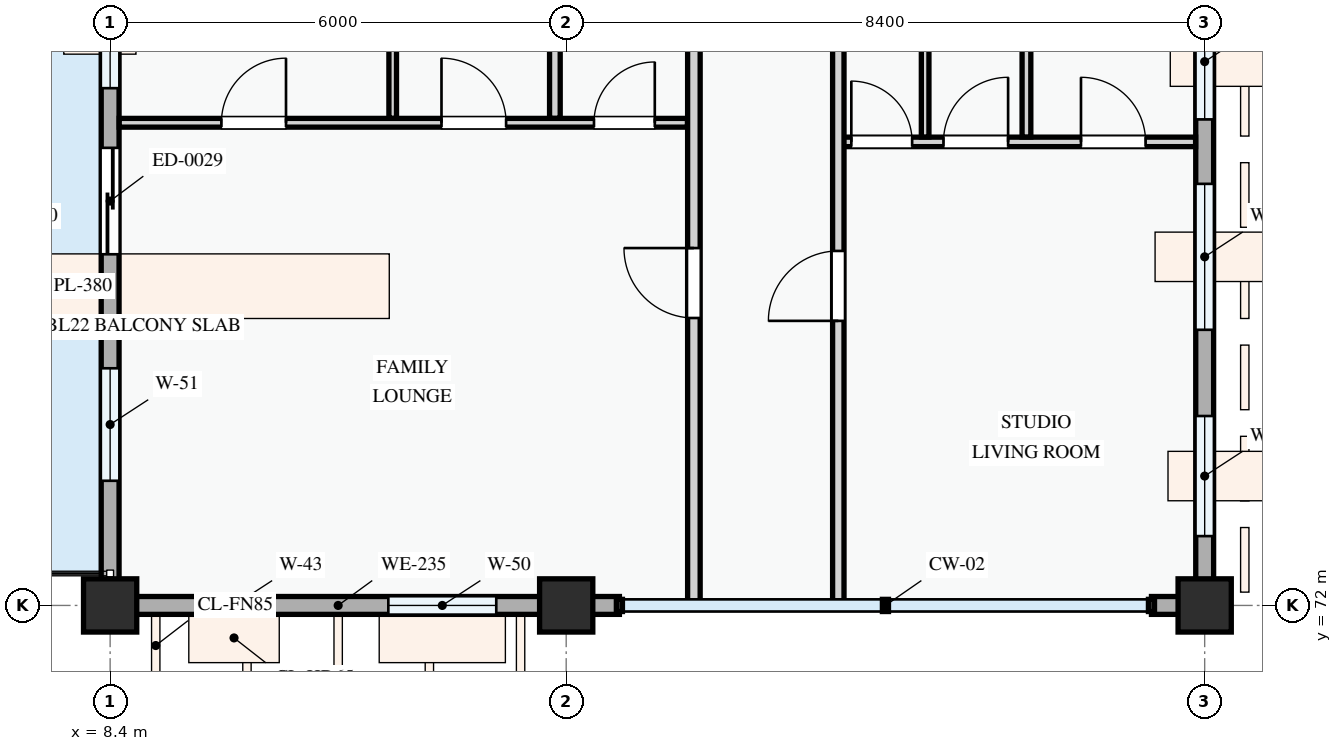
"""IFC4 building model, lengths in metres.
Left out: names, types, materials, properties, quantities, classifications, styles, units other than length and angle.
Written with IfcOpenShell. Run it as: python <this file> out.ifc"""

import sys

from ifc_helpers import new_model, si_unit, direction, frame, frame_2d, origin, origin_2d, place, context, subcontext, project, spatial, rectangle, extrude, element, fill, save


model = new_model("IFC4")
c1 = context("Model", 3, precision=1e-05, world=origin(), true_north=direction((0.0, 1.0)))
c2 = subcontext(c1, "Body", "Model", "MODEL_VIEW")
j1 = project(units=[si_unit("LENGTHUNIT", "METRE"), si_unit("PLANEANGLEUNIT", "RADIAN")], contexts=[c1])
p1 = place(None, origin())
s1 = spatial("IfcSite", under=j1, at=p1, CompositionType="ELEMENT")
p2 = place(p1, origin())
s2 = spatial("IfcBuilding", under=s1, at=p2, CompositionType="ELEMENT")
p3 = place(p2, frame((0.0, 0.0, 11.4)))
s3 = spatial("IfcBuildingStorey", under=s2, at=p3, CompositionType="ELEMENT", Elevation=11.4)
for number, where, z_axis, x_axis in (
    (1, (8.4, 72.0, 0.0), (0.0, 0.0, 1.0), (1.0, 0.0, 0.0)),
    (2, (14.4, 72.0, 0.0), (0.0, 0.0, 1.0), (1.0, 0.0, 0.0)),
    (3, (22.8, 72.0, 0.0), (0.0, 0.0, 1.0), (1.0, 0.0, 0.0)),
):
    element("IfcColumn", number, at=place(p3, frame(where, z_axis=z_axis, x_axis=x_axis)), inside=s3, PredefinedType="COLUMN", context=c2, shape_type="SweptSolid", body=[
        extrude(rectangle(XDim=0.7, YDim=0.7, at=origin_2d()), origin(), (0.0, 0.0, 1.0), 3.3),
    ])
p4 = place(p3, frame((8.4, 80.4, 0.0), z_axis=(0.0, 0.0, 1.0), x_axis=(0.0, -1.0, 0.0)))
e4 = element("IfcWall", 4, at=p4, inside=s3, PredefinedType="STANDARD", context=c2, shape_type="SweptSolid", body=[
    extrude(rectangle(XDim=8.4, YDim=0.235, at=frame_2d((4.2, 0.0))), origin(), (0.0, 0.0, 1.0), 2.425),
])
p5 = place(p4, frame((2.38, 0.0, 0.0)))
e5 = element("IfcOpeningElement", 5, at=p5, cuts=e4, PredefinedType="OPENING", context=c2, shape_type="SweptSolid", body=[
    extrude(rectangle(XDim=1.4, YDim=2.2, at=frame_2d((0.7, 1.1))), frame((0.0, 0.127, 0.0), z_axis=(0.0, -1.0, 0.0), x_axis=(1.0, 0.0, 0.0)), (0.0, 0.0, 1.0), 0.255),
])
p6 = place(p4, frame((0.645, 0.0, 0.78)))
e6 = element("IfcOpeningElement", 6, at=p6, cuts=e4, PredefinedType="OPENING", context=c2, shape_type="SweptSolid", body=[
    extrude(rectangle(XDim=0.95, YDim=1.15, at=frame_2d((0.475, 0.575))), frame((0.0, 0.127, 0.0), z_axis=(0.0, -1.0, 0.0), x_axis=(1.0, 0.0, 0.0)), (0.0, 0.0, 1.0), 0.255),
])
p7 = place(p4, frame((5.28, 0.0, 0.78)))
e7 = element("IfcOpeningElement", 7, at=p7, cuts=e4, PredefinedType="OPENING", context=c2, shape_type="SweptSolid", body=[
    extrude(rectangle(XDim=1.48, YDim=1.52, at=frame_2d((0.74, 0.76))), frame((0.0, 0.127, 0.0), z_axis=(0.0, -1.0, 0.0), x_axis=(1.0, 0.0, 0.0)), (0.0, 0.0, 1.0), 0.255),
])
p8 = place(p3, frame((8.4, 72.0, 0.0), z_axis=(0.0, 0.0, 1.0), x_axis=(1.0, 0.0, 0.0)))
e8 = element("IfcWall", 8, at=p8, inside=s3, PredefinedType="STANDARD", context=c2, shape_type="SweptSolid", body=[
    extrude(rectangle(XDim=6.0, YDim=0.235, at=frame_2d((3.0, 0.0))), origin(), (0.0, 0.0, 1.0), 2.475),
])
p9 = place(p8, frame((1.155, 0.0, 0.78)))
e9 = element("IfcOpeningElement", 9, at=p9, cuts=e8, PredefinedType="OPENING", context=c2, shape_type="SweptSolid", body=[
    extrude(rectangle(XDim=0.95, YDim=1.15, at=frame_2d((0.475, 0.575))), frame((0.0, 0.127, 0.0), z_axis=(0.0, -1.0, 0.0), x_axis=(1.0, 0.0, 0.0)), (0.0, 0.0, 1.0), 0.255),
])
p10 = place(p8, frame((3.66, 0.0, 0.78)))
e10 = element("IfcOpeningElement", 10, at=p10, cuts=e8, PredefinedType="OPENING", context=c2, shape_type="SweptSolid", body=[
    extrude(rectangle(XDim=1.42, YDim=1.38, at=frame_2d((0.71, 0.69))), frame((0.0, 0.127, 0.0), z_axis=(0.0, -1.0, 0.0), x_axis=(1.0, 0.0, 0.0)), (0.0, 0.0, 1.0), 0.255),
])
p11 = place(p3, frame((14.4, 72.0, 0.0), z_axis=(0.0, 0.0, 1.0), x_axis=(1.0, 0.0, 0.0)))
e11 = element("IfcWall", 11, at=p11, inside=s3, PredefinedType="STANDARD", context=c2, shape_type="SweptSolid", body=[
    extrude(rectangle(XDim=0.7, YDim=0.235, at=frame_2d((0.35, 0.0))), origin(), (0.0, 0.0, 1.0), 2.375),
])
p12 = place(p3, frame((22.1, 72.0, 0.0), z_axis=(0.0, 0.0, 1.0), x_axis=(1.0, 0.0, 0.0)))
e12 = element("IfcWall", 12, at=p12, inside=s3, PredefinedType="STANDARD", context=c2, shape_type="SweptSolid", body=[
    extrude(rectangle(XDim=0.58, YDim=0.235, at=frame_2d((0.29, 0.0))), origin(), (0.0, 0.0, 1.0), 2.375),
])
p13 = place(p3, frame((22.8, 72.0, 0.0), z_axis=(0.0, 0.0, 1.0), x_axis=(0.0, 1.0, 0.0)))
e13 = element("IfcWall", 13, at=p13, inside=s3, PredefinedType="STANDARD", context=c2, shape_type="SweptSolid", body=[
    extrude(rectangle(XDim=8.4, YDim=0.235, at=frame_2d((4.2, 0.0))), origin(), (0.0, 0.0, 1.0), 2.425),
])
p14 = place(p13, frame((0.912, 0.0, 0.78)))
e14 = element("IfcOpeningElement", 14, at=p14, cuts=e13, PredefinedType="OPENING", context=c2, shape_type="SweptSolid", body=[
    extrude(rectangle(XDim=1.58, YDim=1.48, at=frame_2d((0.79, 0.74))), frame((0.0, 0.127, 0.0), z_axis=(0.0, -1.0, 0.0), x_axis=(1.0, 0.0, 0.0)), (0.0, 0.0, 1.0), 0.255),
])
p15 = place(p13, frame((3.626, 0.0, 0.78)))
e15 = element("IfcOpeningElement", 15, at=p15, cuts=e13, PredefinedType="OPENING", context=c2, shape_type="SweptSolid", body=[
    extrude(rectangle(XDim=1.92, YDim=1.44, at=frame_2d((0.96, 0.72))), frame((0.0, 0.127, 0.0), z_axis=(0.0, -1.0, 0.0), x_axis=(1.0, 0.0, 0.0)), (0.0, 0.0, 1.0), 0.255),
])
p16 = place(p13, frame((6.394, 0.0, 0.78)))
e16 = element("IfcOpeningElement", 16, at=p16, cuts=e13, PredefinedType="OPENING", context=c2, shape_type="SweptSolid", body=[
    extrude(rectangle(XDim=1.52, YDim=1.42, at=frame_2d((0.76, 0.71))), frame((0.0, 0.127, 0.0), z_axis=(0.0, -1.0, 0.0), x_axis=(1.0, 0.0, 0.0)), (0.0, 0.0, 1.0), 0.255),
])
p17 = place(p3, frame((8.52, 78.35, 0.0), z_axis=(0.0, 0.0, 1.0), x_axis=(1.0, 0.0, 0.0)))
e17 = element("IfcWall", 17, at=p17, inside=s3, PredefinedType="PARTITIONING", context=c2, shape_type="SweptSolid", body=[
    extrude(rectangle(XDim=7.476, YDim=0.115, at=frame_2d((3.738, 0.0))), origin(), (0.0, 0.0, 1.0), 3.0),
])
p18 = place(p17, frame((1.344, 0.0, 0.0)))
e18 = element("IfcOpeningElement", 18, at=p18, cuts=e17, PredefinedType="OPENING", context=c2, shape_type="SweptSolid", body=[
    extrude(rectangle(XDim=0.85, YDim=2.1, at=frame_2d((0.425, 1.05))), frame((0.0, 0.067, 0.0), z_axis=(0.0, -1.0, 0.0), x_axis=(1.0, 0.0, 0.0)), (0.0, 0.0, 1.0), 0.135),
])
p19 = place(p17, frame((4.24, 0.0, 0.0)))
e19 = element("IfcOpeningElement", 19, at=p19, cuts=e17, PredefinedType="OPENING", context=c2, shape_type="SweptSolid", body=[
    extrude(rectangle(XDim=0.85, YDim=2.1, at=frame_2d((0.425, 1.05))), frame((0.0, 0.067, 0.0), z_axis=(0.0, -1.0, 0.0), x_axis=(1.0, 0.0, 0.0)), (0.0, 0.0, 1.0), 0.135),
])
p20 = place(p17, frame((6.246, 0.0, 0.0)))
e20 = element("IfcOpeningElement", 20, at=p20, cuts=e17, PredefinedType="OPENING", context=c2, shape_type="SweptSolid", body=[
    extrude(rectangle(XDim=0.8, YDim=2.1, at=frame_2d((0.4, 1.05))), frame((0.0, 0.067, 0.0), z_axis=(0.0, -1.0, 0.0), x_axis=(1.0, 0.0, 0.0)), (0.0, 0.0, 1.0), 0.135),
])
p21 = place(p3, frame((12.118, 78.409, 0.0), z_axis=(0.0, 0.0, 1.0), x_axis=(0.0, 1.0, 0.0)))
e21 = element("IfcWall", 21, at=p21, inside=s3, PredefinedType="PARTITIONING", context=c2, shape_type="SweptSolid", body=[
    extrude(rectangle(XDim=6.119, YDim=0.1, at=frame_2d((3.059, 0.0))), origin(), (0.0, 0.0, 1.0), 3.0),
])
p22 = place(p3, frame((14.251, 78.409, 0.0), z_axis=(0.0, 0.0, 1.0), x_axis=(0.0, 1.0, 0.0)))
e22 = element("IfcWall", 22, at=p22, inside=s3, PredefinedType="PARTITIONING", context=c2, shape_type="SweptSolid", body=[
    extrude(rectangle(XDim=6.119, YDim=0.14, at=frame_2d((3.059, 0.0))), origin(), (0.0, 0.0, 1.0), 2.425),
])
p23 = place(p3, frame((17.98, 78.098, 0.0), z_axis=(0.0, 0.0, 1.0), x_axis=(1.0, 0.0, 0.0)))
e23 = element("IfcWall", 23, at=p23, inside=s3, PredefinedType="PARTITIONING", context=c2, shape_type="SweptSolid", body=[
    extrude(rectangle(XDim=4.7, YDim=0.125, at=frame_2d((2.35, 0.0))), origin(), (0.0, 0.0, 1.0), 3.0),
])
p24 = place(p23, frame((0.171, 0.0, 0.0)))
e24 = element("IfcOpeningElement", 24, at=p24, cuts=e23, PredefinedType="OPENING", context=c2, shape_type="SweptSolid", body=[
    extrude(rectangle(XDim=0.8, YDim=2.1, at=frame_2d((0.4, 1.05))), frame((0.0, 0.073, 0.0), z_axis=(0.0, -1.0, 0.0), x_axis=(1.0, 0.0, 0.0)), (0.0, 0.0, 1.0), 0.145),
])
p25 = place(p23, frame((1.384, 0.0, 0.0)))
e25 = element("IfcOpeningElement", 25, at=p25, cuts=e23, PredefinedType="OPENING", context=c2, shape_type="SweptSolid", body=[
    extrude(rectangle(XDim=0.85, YDim=2.1, at=frame_2d((0.425, 1.05))), frame((0.0, 0.073, 0.0), z_axis=(0.0, -1.0, 0.0), x_axis=(1.0, 0.0, 0.0)), (0.0, 0.0, 1.0), 0.145),
])
p26 = place(p23, frame((3.193, 0.0, 0.0)))
e26 = element("IfcOpeningElement", 26, at=p26, cuts=e23, PredefinedType="OPENING", context=c2, shape_type="SweptSolid", body=[
    extrude(rectangle(XDim=0.85, YDim=2.1, at=frame_2d((0.425, 1.05))), frame((0.0, 0.073, 0.0), z_axis=(0.0, -1.0, 0.0), x_axis=(1.0, 0.0, 0.0)), (0.0, 0.0, 1.0), 0.145),
])
p27 = place(p3, frame((20.455, 78.163, 0.0), z_axis=(0.0, 0.0, 1.0), x_axis=(0.0, 1.0, 0.0)))
e27 = element("IfcWall", 27, at=p27, inside=s3, PredefinedType="PARTITIONING", context=c2, shape_type="SweptSolid", body=[
    extrude(rectangle(XDim=6.383, YDim=0.115, at=frame_2d((3.191, 0.0))), origin(), (0.0, 0.0, 1.0), 3.0),
])
p28 = place(p3, frame((19.122, 78.163, 0.0), z_axis=(0.0, 0.0, 1.0), x_axis=(0.0, 1.0, 0.0)))
e28 = element("IfcWall", 28, at=p28, inside=s3, PredefinedType="PARTITIONING", context=c2, shape_type="SweptSolid", body=[
    extrude(rectangle(XDim=6.383, YDim=0.1, at=frame_2d((3.191, 0.0))), origin(), (0.0, 0.0, 1.0), 3.0),
])
p29 = place(p3, frame((16.08, 72.06, 0.0), z_axis=(0.0, 0.0, 1.0), x_axis=(0.0, 1.0, 0.0)))
e29 = element("IfcWall", 29, at=p29, inside=s3, PredefinedType="PARTITIONING", context=c2, shape_type="SweptSolid", body=[
    extrude(rectangle(XDim=37.28, YDim=0.165, at=frame_2d((18.64, 0.0))), origin(), (0.0, 0.0, 1.0), 3.0),
])
p30 = place(p29, frame((3.722, 0.0, 0.0)))
e30 = element("IfcOpeningElement", 30, at=p30, cuts=e29, PredefinedType="OPENING", context=c2, shape_type="SweptSolid", body=[
    extrude(rectangle(XDim=0.92, YDim=2.1, at=frame_2d((0.46, 1.05))), frame((0.0, 0.093, 0.0), z_axis=(0.0, -1.0, 0.0), x_axis=(1.0, 0.0, 0.0)), (0.0, 0.0, 1.0), 0.185),
])
p31 = place(p29, frame((17.755, 0.0, 0.0)))
e31 = element("IfcOpeningElement", 31, at=p31, cuts=e29, PredefinedType="OPENING", context=c2, shape_type="SweptSolid", body=[
    extrude(rectangle(XDim=0.92, YDim=2.1, at=frame_2d((0.46, 1.05))), frame((0.0, 0.093, 0.0), z_axis=(0.0, -1.0, 0.0), x_axis=(1.0, 0.0, 0.0)), (0.0, 0.0, 1.0), 0.185),
])
p32 = place(p29, frame((25.6, 0.0, 0.0)))
e32 = element("IfcOpeningElement", 32, at=p32, cuts=e29, PredefinedType="OPENING", context=c2, shape_type="SweptSolid", body=[
    extrude(rectangle(XDim=0.96, YDim=2.12, at=frame_2d((0.48, 1.06))), frame((0.0, 0.093, 0.0), z_axis=(0.0, -1.0, 0.0), x_axis=(1.0, 0.0, 0.0)), (0.0, 0.0, 1.0), 0.185),
])
p33 = place(p3, frame((17.98, 72.06, 0.0), z_axis=(0.0, 0.0, 1.0), x_axis=(0.0, 1.0, 0.0)))
e33 = element("IfcWall", 33, at=p33, inside=s3, PredefinedType="PARTITIONING", context=c2, shape_type="SweptSolid", body=[
    extrude(rectangle(XDim=37.28, YDim=0.15, at=frame_2d((18.64, 0.0))), origin(), (0.0, 0.0, 1.0), 3.0),
])
p34 = place(p33, frame((3.684, 0.0, 0.0)))
e34 = element("IfcOpeningElement", 34, at=p34, cuts=e33, PredefinedType="OPENING", context=c2, shape_type="SweptSolid", body=[
    extrude(rectangle(XDim=0.92, YDim=2.1, at=frame_2d((0.46, 1.05))), frame((0.0, 0.085, 0.0), z_axis=(0.0, -1.0, 0.0), x_axis=(1.0, 0.0, 0.0)), (0.0, 0.0, 1.0), 0.17),
])
p35 = place(p33, frame((17.5, 0.0, 0.0)))
e35 = element("IfcOpeningElement", 35, at=p35, cuts=e33, PredefinedType="OPENING", context=c2, shape_type="SweptSolid", body=[
    extrude(rectangle(XDim=0.92, YDim=2.1, at=frame_2d((0.46, 1.05))), frame((0.0, 0.085, 0.0), z_axis=(0.0, -1.0, 0.0), x_axis=(1.0, 0.0, 0.0)), (0.0, 0.0, 1.0), 0.17),
])
p36 = place(p33, frame((25.6, 0.0, 0.0)))
e36 = element("IfcOpeningElement", 36, at=p36, cuts=e33, PredefinedType="OPENING", context=c2, shape_type="SweptSolid", body=[
    extrude(rectangle(XDim=0.92, YDim=2.1, at=frame_2d((0.46, 1.05))), frame((0.0, 0.085, 0.0), z_axis=(0.0, -1.0, 0.0), x_axis=(1.0, 0.0, 0.0)), (0.0, 0.0, 1.0), 0.17),
])
p37 = place(p5, frame((1.4, 0.0, 0.0), z_axis=(0.0, 0.0, 1.0), x_axis=(-1.0, 0.0, 0.0)))
e37 = element("IfcDoor", 37, at=p37, inside=s3, OperationType="SLIDING_TO_LEFT", PredefinedType="DOOR", context=c2, shape_type="SweptSolid", body=[
    extrude(rectangle(XDim=1.4, YDim=2.2, at=frame_2d((0.7, 1.1))), frame((0.0, 0.025, 0.0), z_axis=(0.0, -1.0, 0.0), x_axis=(1.0, 0.0, 0.0)), (0.0, 0.0, 1.0), 0.05),
])
fill(e5, e37)
p38 = place(p6, origin())
e38 = element("IfcWindow", 38, at=p38, inside=s3, PartitioningType="SINGLE_PANEL", PredefinedType="WINDOW", context=c2, shape_type="SweptSolid", body=[
    extrude(rectangle(XDim=0.95, YDim=1.15, at=frame_2d((0.475, 0.575))), frame((0.0, 0.03, 0.0), z_axis=(0.0, -1.0, 0.0), x_axis=(1.0, 0.0, 0.0)), (0.0, 0.0, 1.0), 0.06),
])
fill(e6, e38)
p39 = place(p7, origin())
e39 = element("IfcWindow", 39, at=p39, inside=s3, PartitioningType="SINGLE_PANEL", PredefinedType="WINDOW", context=c2, shape_type="SweptSolid", body=[
    extrude(rectangle(XDim=1.48, YDim=1.52, at=frame_2d((0.74, 0.76))), frame((0.0, 0.03, 0.0), z_axis=(0.0, -1.0, 0.0), x_axis=(1.0, 0.0, 0.0)), (0.0, 0.0, 1.0), 0.06),
])
fill(e7, e39)
p40 = place(p9, origin())
e40 = element("IfcWindow", 40, at=p40, inside=s3, PartitioningType="SINGLE_PANEL", PredefinedType="WINDOW", context=c2, shape_type="SweptSolid", body=[
    extrude(rectangle(XDim=0.95, YDim=1.15, at=frame_2d((0.475, 0.575))), frame((0.0, 0.03, 0.0), z_axis=(0.0, -1.0, 0.0), x_axis=(1.0, 0.0, 0.0)), (0.0, 0.0, 1.0), 0.06),
])
fill(e9, e40)
p41 = place(p10, origin())
e41 = element("IfcWindow", 41, at=p41, inside=s3, PartitioningType="SINGLE_PANEL", PredefinedType="WINDOW", context=c2, shape_type="SweptSolid", body=[
    extrude(rectangle(XDim=1.42, YDim=1.38, at=frame_2d((0.71, 0.69))), frame((0.0, 0.03, 0.0), z_axis=(0.0, -1.0, 0.0), x_axis=(1.0, 0.0, 0.0)), (0.0, 0.0, 1.0), 0.06),
])
fill(e10, e41)
p42 = place(p14, origin())
e42 = element("IfcWindow", 42, at=p42, inside=s3, PartitioningType="SINGLE_PANEL", PredefinedType="WINDOW", context=c2, shape_type="SweptSolid", body=[
    extrude(rectangle(XDim=1.58, YDim=1.48, at=frame_2d((0.79, 0.74))), frame((0.0, 0.03, 0.0), z_axis=(0.0, -1.0, 0.0), x_axis=(1.0, 0.0, 0.0)), (0.0, 0.0, 1.0), 0.06),
])
fill(e14, e42)
p43 = place(p15, origin())
e43 = element("IfcWindow", 43, at=p43, inside=s3, PartitioningType="DOUBLE_PANEL_VERTICAL", PredefinedType="WINDOW", context=c2, shape_type="SweptSolid", body=[
    extrude(rectangle(XDim=1.92, YDim=1.44, at=frame_2d((0.96, 0.72))), frame((0.0, 0.03, 0.0), z_axis=(0.0, -1.0, 0.0), x_axis=(1.0, 0.0, 0.0)), (0.0, 0.0, 1.0), 0.06),
])
fill(e15, e43)
p44 = place(p16, origin())
e44 = element("IfcWindow", 44, at=p44, inside=s3, PartitioningType="SINGLE_PANEL", PredefinedType="WINDOW", context=c2, shape_type="SweptSolid", body=[
    extrude(rectangle(XDim=1.52, YDim=1.42, at=frame_2d((0.76, 0.71))), frame((0.0, 0.03, 0.0), z_axis=(0.0, -1.0, 0.0), x_axis=(1.0, 0.0, 0.0)), (0.0, 0.0, 1.0), 0.06),
])
fill(e16, e44)
p45 = place(p18, origin())
e45 = element("IfcDoor", 45, at=p45, inside=s3, OperationType="SINGLE_SWING_RIGHT", PredefinedType="DOOR", context=c2, shape_type="SweptSolid", body=[
    extrude(rectangle(XDim=0.85, YDim=2.1, at=frame_2d((0.425, 1.05))), frame((0.0, 0.025, 0.0), z_axis=(0.0, -1.0, 0.0), x_axis=(1.0, 0.0, 0.0)), (0.0, 0.0, 1.0), 0.05),
])
fill(e18, e45)
p46 = place(p19, origin())
e46 = element("IfcDoor", 46, at=p46, inside=s3, OperationType="SINGLE_SWING_LEFT", PredefinedType="DOOR", context=c2, shape_type="SweptSolid", body=[
    extrude(rectangle(XDim=0.85, YDim=2.1, at=frame_2d((0.425, 1.05))), frame((0.0, 0.025, 0.0), z_axis=(0.0, -1.0, 0.0), x_axis=(1.0, 0.0, 0.0)), (0.0, 0.0, 1.0), 0.05),
])
fill(e19, e46)
p47 = place(p20, origin())
e47 = element("IfcDoor", 47, at=p47, inside=s3, OperationType="SINGLE_SWING_RIGHT", PredefinedType="DOOR", context=c2, shape_type="SweptSolid", body=[
    extrude(rectangle(XDim=0.8, YDim=2.1, at=frame_2d((0.4, 1.05))), frame((0.0, 0.025, 0.0), z_axis=(0.0, -1.0, 0.0), x_axis=(1.0, 0.0, 0.0)), (0.0, 0.0, 1.0), 0.05),
])
fill(e20, e47)
p48 = place(p24, origin())
e48 = element("IfcDoor", 48, at=p48, inside=s3, OperationType="SINGLE_SWING_LEFT", PredefinedType="DOOR", context=c2, shape_type="SweptSolid", body=[
    extrude(rectangle(XDim=0.8, YDim=2.1, at=frame_2d((0.4, 1.05))), frame((0.0, 0.025, 0.0), z_axis=(0.0, -1.0, 0.0), x_axis=(1.0, 0.0, 0.0)), (0.0, 0.0, 1.0), 0.05),
])
fill(e24, e48)
p49 = place(p25, origin())
e49 = element("IfcDoor", 49, at=p49, inside=s3, OperationType="SINGLE_SWING_RIGHT", PredefinedType="DOOR", context=c2, shape_type="SweptSolid", body=[
    extrude(rectangle(XDim=0.85, YDim=2.1, at=frame_2d((0.425, 1.05))), frame((0.0, 0.025, 0.0), z_axis=(0.0, -1.0, 0.0), x_axis=(1.0, 0.0, 0.0)), (0.0, 0.0, 1.0), 0.05),
])
fill(e25, e49)
p50 = place(p26, origin())
e50 = element("IfcDoor", 50, at=p50, inside=s3, OperationType="SINGLE_SWING_LEFT", PredefinedType="DOOR", context=c2, shape_type="SweptSolid", body=[
    extrude(rectangle(XDim=0.85, YDim=2.1, at=frame_2d((0.425, 1.05))), frame((0.0, 0.025, 0.0), z_axis=(0.0, -1.0, 0.0), x_axis=(1.0, 0.0, 0.0)), (0.0, 0.0, 1.0), 0.05),
])
fill(e26, e50)
p51 = place(p30, origin())
e51 = element("IfcDoor", 51, at=p51, inside=s3, OperationType="SINGLE_SWING_RIGHT", PredefinedType="DOOR", context=c2, shape_type="SweptSolid", body=[
    extrude(rectangle(XDim=0.92, YDim=2.1, at=frame_2d((0.46, 1.05))), frame((0.0, 0.025, 0.0), z_axis=(0.0, -1.0, 0.0), x_axis=(1.0, 0.0, 0.0)), (0.0, 0.0, 1.0), 0.05),
])
fill(e30, e51)
p52 = place(p34, origin())
e52 = element("IfcDoor", 52, at=p52, inside=s3, OperationType="SINGLE_SWING_LEFT", PredefinedType="DOOR", context=c2, shape_type="SweptSolid", body=[
    extrude(rectangle(XDim=0.92, YDim=2.1, at=frame_2d((0.46, 1.05))), frame((0.0, 0.025, 0.0), z_axis=(0.0, -1.0, 0.0), x_axis=(1.0, 0.0, 0.0)), (0.0, 0.0, 1.0), 0.05),
])
fill(e34, e52)
save(model, sys.argv[1])
